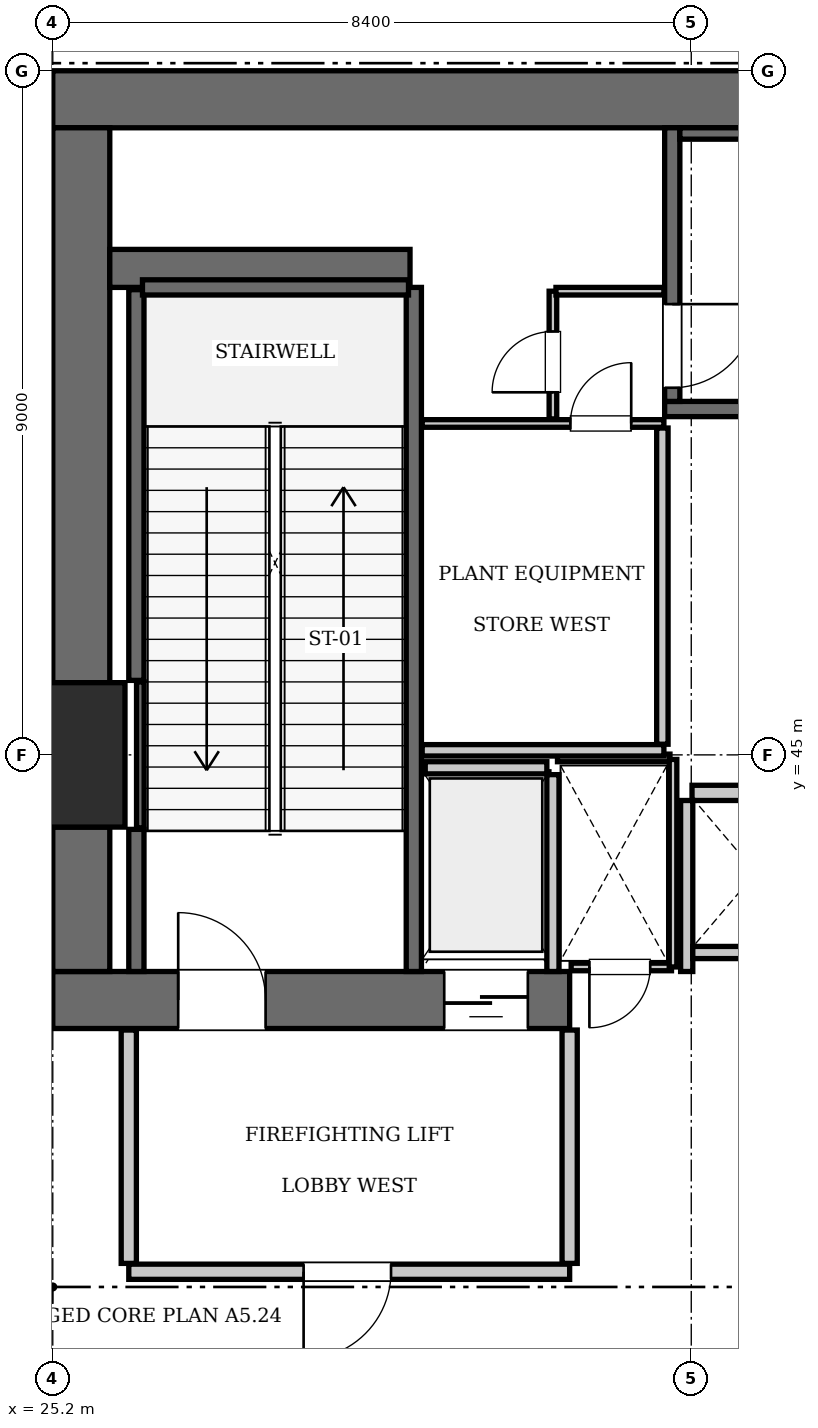
"""IFC4 building model, lengths in metres.
Left out: names, types, materials, properties, quantities, classifications, styles, units other than length and angle.
Written with IfcOpenShell. Run it as: python <this file> out.ifc"""

import sys

from ifc_helpers import new_model, si_unit, direction, frame, frame_2d, origin, origin_2d, place, context, subcontext, project, spatial, rectangle, extrude, element, fill, save


model = new_model("IFC4")
c1 = context("Model", 3, precision=1e-05, world=origin(), true_north=direction((0.0, 1.0)))
c2 = subcontext(c1, "Body", "Model", "MODEL_VIEW")
j1 = project(units=[si_unit("LENGTHUNIT", "METRE"), si_unit("PLANEANGLEUNIT", "RADIAN")], contexts=[c1])
p1 = place(None, origin())
s1 = spatial("IfcSite", under=j1, at=p1, CompositionType="ELEMENT")
p2 = place(p1, origin())
s2 = spatial("IfcBuilding", under=s1, at=p2, CompositionType="ELEMENT")
p3 = place(p2, frame((0.0, 0.0, 227.5)))
s3 = spatial("IfcBuildingStorey", under=s2, at=p3, CompositionType="ELEMENT", Elevation=227.5)
p4 = place(p3, frame((25.2, 45.0, 0.0), z_axis=(0.0, 0.0, 1.0), x_axis=(1.0, 0.0, 0.0)))
e1 = element("IfcColumn", 1, at=p4, inside=s3, PredefinedType="COLUMN", context=c2, shape_type="SweptSolid", body=[
    extrude(rectangle(XDim=1.9, YDim=1.9, at=origin_2d()), origin(), (0.0, 0.0, 1.0), 7.0),
])
p5 = place(p3, frame((25.2, 53.625, 0.0), z_axis=(0.0, 0.0, 1.0), x_axis=(1.0, 0.0, 0.0)))
e2 = element("IfcWall", 2, at=p5, inside=s3, PredefinedType="SHEAR", context=c2, shape_type="SweptSolid", body=[
    extrude(rectangle(XDim=25.2, YDim=0.75, at=frame_2d((12.6, 0.0))), origin(), (0.0, 0.0, 1.0), 7.0),
])
p6 = place(p3, frame((25.2, 41.775, 0.0), z_axis=(0.0, 0.0, 1.0), x_axis=(1.0, 0.0, 0.0)))
e3 = element("IfcWall", 3, at=p6, inside=s3, PredefinedType="SHEAR", context=c2, shape_type="SweptSolid", body=[
    extrude(rectangle(XDim=6.8, YDim=0.75, at=frame_2d((3.4, 0.0))), origin(), (0.0, 0.0, 1.0), 7.0),
])
p7 = place(p6, frame((1.65, 0.0, 0.0)))
e4 = element("IfcOpeningElement", 4, at=p7, cuts=e3, PredefinedType="OPENING", context=c2, shape_type="SweptSolid", body=[
    extrude(rectangle(XDim=1.15, YDim=2.15, at=frame_2d((0.575, 1.075))), frame((0.0, 0.385, 0.0), z_axis=(0.0, -1.0, 0.0), x_axis=(1.0, 0.0, 0.0)), (0.0, 0.0, 1.0), 0.77),
])
p8 = place(p6, frame((5.15, 0.0, 0.0)))
e5 = element("IfcOpeningElement", 5, at=p8, cuts=e3, PredefinedType="OPENING", context=c2, shape_type="SweptSolid", body=[
    extrude(rectangle(XDim=1.1, YDim=2.2, at=frame_2d((0.55, 1.1))), frame((0.0, 0.385, 0.0), z_axis=(0.0, -1.0, 0.0), x_axis=(1.0, 0.0, 0.0)), (0.0, 0.0, 1.0), 0.77),
])
p9 = place(p3, frame((25.575, 42.15, 0.0), z_axis=(0.0, 0.0, 1.0), x_axis=(0.0, 1.0, 0.0)))
e6 = element("IfcWall", 6, at=p9, inside=s3, PredefinedType="SHEAR", context=c2, shape_type="SweptSolid", body=[
    extrude(rectangle(XDim=1.9, YDim=0.75, at=frame_2d((0.95, 0.0))), origin(), (0.0, 0.0, 1.0), 7.0),
])
p10 = place(p3, frame((25.575, 45.95, 0.0), z_axis=(0.0, 0.0, 1.0), x_axis=(0.0, 1.0, 0.0)))
e7 = element("IfcWall", 7, at=p10, inside=s3, PredefinedType="SHEAR", context=c2, shape_type="SweptSolid", body=[
    extrude(rectangle(XDim=7.3, YDim=0.75, at=frame_2d((3.65, 0.0))), origin(), (0.0, 0.0, 1.0), 7.0),
])
p11 = place(p3, frame((25.95, 51.4, 0.0), z_axis=(0.0, 0.0, 1.0), x_axis=(1.0, 0.0, 0.0)))
e8 = element("IfcWall", 8, at=p11, inside=s3, PredefinedType="SHEAR", context=c2, shape_type="SweptSolid", body=[
    extrude(rectangle(XDim=3.95, YDim=0.5, at=frame_2d((1.975, 0.0))), origin(), (0.0, 0.0, 1.0), 7.0),
])
p12 = place(p3, frame((29.95, 42.15, 0.0), z_axis=(0.0, 0.0, 1.0), x_axis=(0.0, 1.0, 0.0)))
e9 = element("IfcWall", 9, at=p12, inside=s3, PredefinedType="SOLIDWALL", context=c2, shape_type="SweptSolid", body=[
    extrude(rectangle(XDim=9.0, YDim=0.2, at=frame_2d((4.5, 0.0))), origin(), (0.0, 0.0, 1.0), 6.76),
])
p13 = place(p3, frame((26.3, 42.15, 0.0), z_axis=(0.0, 0.0, 1.0), x_axis=(0.0, 1.0, 0.0)))
e10 = element("IfcWall", 10, at=p13, inside=s3, PredefinedType="SOLIDWALL", context=c2, shape_type="SweptSolid", body=[
    extrude(rectangle(XDim=1.87, YDim=0.2, at=frame_2d((0.935, 0.0))), origin(), (0.0, 0.0, 1.0), 6.76),
])
p14 = place(p3, frame((26.3, 45.98, 0.0), z_axis=(0.0, 0.0, 1.0), x_axis=(0.0, 1.0, 0.0)))
e11 = element("IfcWall", 11, at=p14, inside=s3, PredefinedType="SOLIDWALL", context=c2, shape_type="SweptSolid", body=[
    extrude(rectangle(XDim=5.14, YDim=0.2, at=frame_2d((2.57, 0.0))), origin(), (0.0, 0.0, 1.0), 6.76),
])
p15 = place(p3, frame((26.38, 51.15, 0.0), z_axis=(0.0, 0.0, 1.0), x_axis=(1.0, 0.0, 0.0)))
e12 = element("IfcWall", 12, at=p15, inside=s3, PredefinedType="SOLIDWALL", context=c2, shape_type="SweptSolid", body=[
    extrude(rectangle(XDim=3.5, YDim=0.2, at=frame_2d((1.75, 0.0))), origin(), (0.0, 0.0, 1.0), 6.76),
])
p16 = place(p3, frame((26.352, 44.04, 0.0), z_axis=(0.0, 0.0, 1.0), x_axis=(0.0, 1.0, 0.0)))
e13 = element("IfcWall", 13, at=p16, inside=s3, PredefinedType="SOLIDWALL", context=c2, shape_type="SweptSolid", body=[
    extrude(rectangle(XDim=1.92, YDim=0.1, at=frame_2d((0.96, 0.0))), origin(), (0.0, 0.0, 1.0), 6.76),
])
p17 = place(p3, frame((33.25, 49.55, 0.0), z_axis=(0.0, 0.0, 1.0), x_axis=(1.0, 0.0, 0.0)))
e14 = element("IfcWall", 14, at=p17, inside=s3, PredefinedType="SOLIDWALL", context=c2, shape_type="SweptSolid", body=[
    extrude(rectangle(XDim=9.1, YDim=0.2, at=frame_2d((4.55, 0.0))), origin(), (0.0, 0.0, 1.0), 6.76),
])
p18 = place(p3, frame((33.35, 49.65, 0.0), z_axis=(0.0, 0.0, 1.0), x_axis=(0.0, 1.0, 0.0)))
e15 = element("IfcWall", 15, at=p18, inside=s3, PredefinedType="SOLIDWALL", context=c2, shape_type="SweptSolid", body=[
    extrude(rectangle(XDim=3.6, YDim=0.2, at=frame_2d((1.8, 0.0))), origin(), (0.0, 0.0, 1.0), 6.76),
])
p19 = place(p18, frame((0.18, 0.0, 0.0)))
e16 = element("IfcOpeningElement", 16, at=p19, cuts=e15, PredefinedType="OPENING", context=c2, shape_type="SweptSolid", body=[
    extrude(rectangle(XDim=1.1, YDim=2.15, at=frame_2d((0.55, 1.075))), frame((0.0, 0.11, 0.0), z_axis=(0.0, -1.0, 0.0), x_axis=(1.0, 0.0, 0.0)), (0.0, 0.0, 1.0), 0.22),
])
p20 = place(p3, frame((33.45, 53.175, 0.0), z_axis=(0.0, 0.0, 1.0), x_axis=(1.0, 0.0, 0.0)))
e17 = element("IfcWall", 17, at=p20, inside=s3, PredefinedType="SOLIDWALL", context=c2, shape_type="SweptSolid", body=[
    extrude(rectangle(XDim=8.7, YDim=0.15, at=frame_2d((4.35, 0.0))), origin(), (0.0, 0.0, 1.0), 6.76),
])
p21 = place(p3, frame((33.61, 44.5, 0.0), z_axis=(0.0, 0.0, 1.0), x_axis=(1.0, 0.0, 0.0)))
e18 = element("IfcWall", 18, at=p21, inside=s3, PredefinedType="SOLIDWALL", context=c2, shape_type="SweptSolid", body=[
    extrude(rectangle(XDim=1.68, YDim=0.2, at=frame_2d((0.84, 0.0))), origin(), (0.0, 0.0, 1.0), 6.76),
])
p22 = place(p3, frame((30.1, 44.83, 0.0), z_axis=(0.0, 0.0, 1.0), x_axis=(1.0, 0.0, 0.0)))
e19 = element("IfcWall", 19, at=p22, inside=s3, PredefinedType="SOLIDWALL", context=c2, shape_type="SweptSolid", body=[
    extrude(rectangle(XDim=1.6, YDim=0.16, at=frame_2d((0.8, 0.0))), origin(), (0.0, 0.0, 1.0), 6.76),
])
p23 = place(p3, frame((31.78, 42.15, 0.0), z_axis=(0.0, 0.0, 1.0), x_axis=(0.0, 1.0, 0.0)))
e20 = element("IfcWall", 20, at=p23, inside=s3, PredefinedType="SOLIDWALL", context=c2, shape_type="SweptSolid", body=[
    extrude(rectangle(XDim=2.59, YDim=0.16, at=frame_2d((1.295, 0.0))), origin(), (0.0, 0.0, 1.0), 6.76),
])
p24 = place(p3, frame((33.54, 42.15, 0.0), z_axis=(0.0, 0.0, 1.0), x_axis=(0.0, 1.0, 0.0)))
e21 = element("IfcWall", 21, at=p24, inside=s3, PredefinedType="SOLIDWALL", context=c2, shape_type="SweptSolid", body=[
    extrude(rectangle(XDim=2.25, YDim=0.16, at=frame_2d((1.125, 0.0))), origin(), (0.0, 0.0, 1.0), 6.76),
])
p25 = place(p3, frame((33.62, 42.4, 0.0), z_axis=(0.0, 0.0, 1.0), x_axis=(1.0, 0.0, 0.0)))
e22 = element("IfcWall", 22, at=p25, inside=s3, PredefinedType="SOLIDWALL", context=c2, shape_type="SweptSolid", body=[
    extrude(rectangle(XDim=1.66, YDim=0.16, at=frame_2d((0.83, 0.0))), origin(), (0.0, 0.0, 1.0), 6.76),
])
p26 = place(p3, frame((26.2, 38.2, 0.0), z_axis=(0.0, 0.0, 1.0), x_axis=(1.0, 0.0, 0.0)))
e23 = element("IfcWall", 23, at=p26, inside=s3, PredefinedType="PARTITIONING", context=c2, shape_type="SweptSolid", body=[
    extrude(rectangle(XDim=5.8, YDim=0.2, at=frame_2d((2.9, 0.0))), origin(), (0.0, 0.0, 1.0), 6.76),
])
p27 = place(p26, frame((2.3, 0.0, 0.0)))
e24 = element("IfcOpeningElement", 24, at=p27, cuts=e23, PredefinedType="OPENING", context=c2, shape_type="SweptSolid", body=[
    extrude(rectangle(XDim=1.15, YDim=2.15, at=frame_2d((0.575, 1.075))), frame((0.0, 0.11, 0.0), z_axis=(0.0, -1.0, 0.0), x_axis=(1.0, 0.0, 0.0)), (0.0, 0.0, 1.0), 0.22),
])
for number, where, z_axis, x_axis in (
    (25, (26.2, 38.31, 0.0), (0.0, 0.0, 1.0), (0.0, 1.0, 0.0)),
    (26, (32.0, 38.31, 0.0), (0.0, 0.0, 1.0), (0.0, 1.0, 0.0)),
):
    element("IfcWall", number, at=place(p3, frame(where, z_axis=z_axis, x_axis=x_axis)), inside=s3, PredefinedType="PARTITIONING", context=c2, shape_type="SweptSolid", body=[
        extrude(rectangle(XDim=3.07, YDim=0.2, at=frame_2d((1.535, 0.0))), origin(), (0.0, 0.0, 1.0), 6.76),
    ])
p28 = place(p3, frame((32.02, 42.21, 0.0), z_axis=(0.0, 0.0, 1.0), x_axis=(1.0, 0.0, 0.0)))
e27 = element("IfcWall", 27, at=p28, inside=s3, PredefinedType="PARTITIONING", context=c2, shape_type="SweptSolid", body=[
    extrude(rectangle(XDim=1.32, YDim=0.1, at=frame_2d((0.66, 0.0))), origin(), (0.0, 0.0, 1.0), 6.76),
])
p29 = place(p28, frame((0.24, 0.0, 0.0)))
e28 = element("IfcOpeningElement", 28, at=p29, cuts=e27, PredefinedType="OPENING", context=c2, shape_type="SweptSolid", body=[
    extrude(rectangle(XDim=0.8, YDim=2.05, at=frame_2d((0.4, 1.025))), frame((0.0, 0.06, 0.0), z_axis=(0.0, -1.0, 0.0), x_axis=(1.0, 0.0, 0.0)), (0.0, 0.0, 1.0), 0.12),
])
p30 = place(p3, frame((31.84, 44.96, 0.0), z_axis=(0.0, 0.0, 1.0), x_axis=(1.0, 0.0, 0.0)))
e29 = element("IfcWall", 29, at=p30, inside=s3, PredefinedType="PARTITIONING", context=c2, shape_type="SweptSolid", body=[
    extrude(rectangle(XDim=1.48, YDim=0.1, at=frame_2d((0.74, 0.0))), origin(), (0.0, 0.0, 1.0), 6.76),
])
p31 = place(p3, frame((33.36, 42.21, 0.0), z_axis=(0.0, 0.0, 1.0), x_axis=(0.0, 1.0, 0.0)))
e30 = element("IfcWall", 30, at=p31, inside=s3, PredefinedType="PARTITIONING", context=c2, shape_type="SweptSolid", body=[
    extrude(rectangle(XDim=2.73, YDim=0.1, at=frame_2d((1.365, 0.0))), origin(), (0.0, 0.0, 1.0), 6.76),
])
p32 = place(p3, frame((30.06, 45.06, 0.0), z_axis=(0.0, 0.0, 1.0), x_axis=(1.0, 0.0, 0.0)))
e31 = element("IfcWall", 31, at=p32, inside=s3, PredefinedType="PARTITIONING", context=c2, shape_type="SweptSolid", body=[
    extrude(rectangle(XDim=3.18, YDim=0.15, at=frame_2d((1.59, 0.0))), origin(), (0.0, 0.0, 1.0), 6.76),
])
p33 = place(p3, frame((33.22, 45.14, 0.0), z_axis=(0.0, 0.0, 1.0), x_axis=(0.0, 1.0, 0.0)))
e32 = element("IfcWall", 32, at=p33, inside=s3, PredefinedType="PARTITIONING", context=c2, shape_type="SweptSolid", body=[
    extrude(rectangle(XDim=4.16, YDim=0.15, at=frame_2d((2.08, 0.0))), origin(), (0.0, 0.0, 1.0), 6.76),
])
p34 = place(p3, frame((30.06, 49.36, 0.0), z_axis=(0.0, 0.0, 1.0), x_axis=(1.0, 0.0, 0.0)))
e33 = element("IfcWall", 33, at=p34, inside=s3, PredefinedType="PARTITIONING", context=c2, shape_type="SweptSolid", body=[
    extrude(rectangle(XDim=3.18, YDim=0.1, at=frame_2d((1.59, 0.0))), origin(), (0.0, 0.0, 1.0), 6.76),
])
p35 = place(p34, frame((1.95, 0.0, 0.0)))
e34 = element("IfcOpeningElement", 34, at=p35, cuts=e33, PredefinedType="OPENING", context=c2, shape_type="SweptSolid", body=[
    extrude(rectangle(XDim=0.8, YDim=2.05, at=frame_2d((0.4, 1.025))), frame((0.0, 0.06, 0.0), z_axis=(0.0, -1.0, 0.0), x_axis=(1.0, 0.0, 0.0)), (0.0, 0.0, 1.0), 0.12),
])
p36 = place(p3, frame((31.78, 49.42, 0.0), z_axis=(0.0, 0.0, 1.0), x_axis=(0.0, 1.0, 0.0)))
e35 = element("IfcWall", 35, at=p36, inside=s3, PredefinedType="PARTITIONING", context=c2, shape_type="SweptSolid", body=[
    extrude(rectangle(XDim=1.68, YDim=0.1, at=frame_2d((0.84, 0.0))), origin(), (0.0, 0.0, 1.0), 6.76),
])
p37 = place(p36, frame((0.35, 0.0, 0.0)))
e36 = element("IfcOpeningElement", 36, at=p37, cuts=e35, PredefinedType="OPENING", context=c2, shape_type="SweptSolid", body=[
    extrude(rectangle(XDim=0.8, YDim=2.05, at=frame_2d((0.4, 1.025))), frame((0.0, 0.06, 0.0), z_axis=(0.0, -1.0, 0.0), x_axis=(1.0, 0.0, 0.0)), (0.0, 0.0, 1.0), 0.12),
])
p38 = place(p3, frame((31.82, 51.1, 0.0), z_axis=(0.0, 0.0, 1.0), x_axis=(1.0, 0.0, 0.0)))
e37 = element("IfcWall", 37, at=p38, inside=s3, PredefinedType="PARTITIONING", context=c2, shape_type="SweptSolid", body=[
    extrude(rectangle(XDim=1.42, YDim=0.1, at=frame_2d((0.71, 0.0))), origin(), (0.0, 0.0, 1.0), 6.76),
])
p39 = place(p7, origin())
e38 = element("IfcDoor", 38, at=p39, inside=s3, OperationType="SINGLE_SWING_LEFT", PredefinedType="DOOR", context=c2, shape_type="SweptSolid", body=[
    extrude(rectangle(XDim=1.15, YDim=2.15, at=frame_2d((0.575, 1.075))), frame((0.0, 0.025, 0.0), z_axis=(0.0, -1.0, 0.0), x_axis=(1.0, 0.0, 0.0)), (0.0, 0.0, 1.0), 0.05),
])
fill(e4, e38)
p40 = place(p19, frame((1.1, 0.0, 0.0), z_axis=(0.0, 0.0, 1.0), x_axis=(-1.0, 0.0, 0.0)))
e39 = element("IfcDoor", 39, at=p40, inside=s3, OperationType="SINGLE_SWING_LEFT", PredefinedType="DOOR", context=c2, shape_type="SweptSolid", body=[
    extrude(rectangle(XDim=1.1, YDim=2.15, at=frame_2d((0.55, 1.075))), frame((0.0, 0.025, 0.0), z_axis=(0.0, -1.0, 0.0), x_axis=(1.0, 0.0, 0.0)), (0.0, 0.0, 1.0), 0.05),
])
fill(e16, e39)
p41 = place(p8, frame((1.1, 0.0, 0.0), z_axis=(0.0, 0.0, 1.0), x_axis=(-1.0, 0.0, 0.0)))
e40 = element("IfcDoor", 40, at=p41, inside=s3, OperationType="SLIDING_TO_LEFT", PredefinedType="DOOR", context=c2, shape_type="SweptSolid", body=[
    extrude(rectangle(XDim=1.1, YDim=2.2, at=frame_2d((0.55, 1.1))), frame((0.0, 0.025, 0.0), z_axis=(0.0, -1.0, 0.0), x_axis=(1.0, 0.0, 0.0)), (0.0, 0.0, 1.0), 0.05),
])
fill(e5, e40)
p42 = place(p27, frame((1.15, 0.0, 0.0), z_axis=(0.0, 0.0, 1.0), x_axis=(-1.0, 0.0, 0.0)))
e41 = element("IfcDoor", 41, at=p42, inside=s3, OperationType="SINGLE_SWING_RIGHT", PredefinedType="DOOR", context=c2, shape_type="SweptSolid", body=[
    extrude(rectangle(XDim=1.15, YDim=2.15, at=frame_2d((0.575, 1.075))), frame((0.0, 0.025, 0.0), z_axis=(0.0, -1.0, 0.0), x_axis=(1.0, 0.0, 0.0)), (0.0, 0.0, 1.0), 0.05),
])
fill(e24, e41)
p43 = place(p29, frame((0.8, 0.0, 0.0), z_axis=(0.0, 0.0, 1.0), x_axis=(-1.0, 0.0, 0.0)))
e42 = element("IfcDoor", 42, at=p43, inside=s3, OperationType="SINGLE_SWING_RIGHT", PredefinedType="DOOR", context=c2, shape_type="SweptSolid", body=[
    extrude(rectangle(XDim=0.8, YDim=2.05, at=frame_2d((0.4, 1.025))), frame((0.0, 0.025, 0.0), z_axis=(0.0, -1.0, 0.0), x_axis=(1.0, 0.0, 0.0)), (0.0, 0.0, 1.0), 0.05),
])
fill(e28, e42)
p44 = place(p35, origin())
e43 = element("IfcDoor", 43, at=p44, inside=s3, OperationType="SINGLE_SWING_RIGHT", PredefinedType="DOOR", context=c2, shape_type="SweptSolid", body=[
    extrude(rectangle(XDim=0.8, YDim=2.05, at=frame_2d((0.4, 1.025))), frame((0.0, 0.025, 0.0), z_axis=(0.0, -1.0, 0.0), x_axis=(1.0, 0.0, 0.0)), (0.0, 0.0, 1.0), 0.05),
])
fill(e34, e43)
p45 = place(p37, origin())
e44 = element("IfcDoor", 44, at=p45, inside=s3, OperationType="SINGLE_SWING_LEFT", PredefinedType="DOOR", context=c2, shape_type="SweptSolid", body=[
    extrude(rectangle(XDim=0.8, YDim=2.05, at=frame_2d((0.4, 1.025))), frame((0.0, 0.025, 0.0), z_axis=(0.0, -1.0, 0.0), x_axis=(1.0, 0.0, 0.0)), (0.0, 0.0, 1.0), 0.05),
])
fill(e36, e44)
save(model, sys.argv[1])
